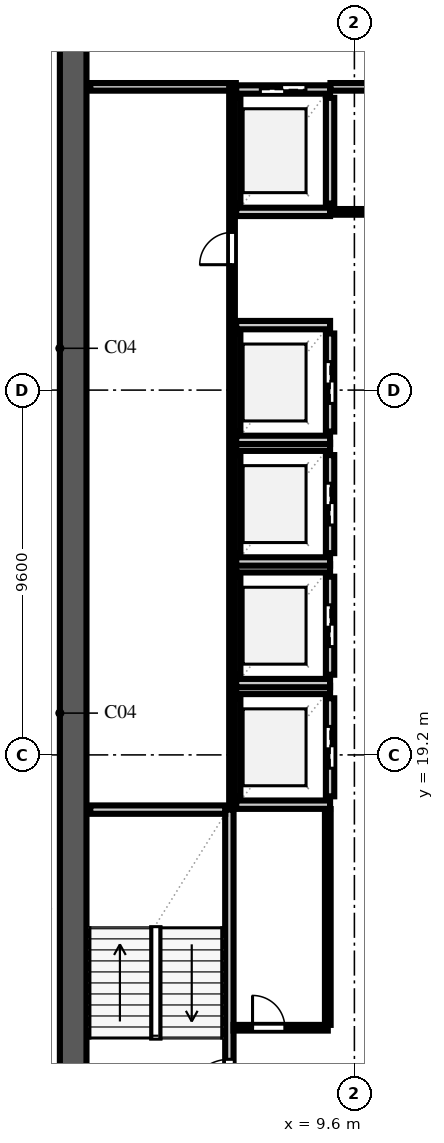
"""IFC4 building model, lengths in metres.
Left out: names, types, materials, properties, quantities, classifications, styles, units other than length and angle.
Written with IfcOpenShell. Run it as: python <this file> out.ifc"""

import sys

from ifc_helpers import new_model, si_unit, direction, frame, frame_2d, origin, place, context, subcontext, project, spatial, rectangle, extrude, element, fill, save


model = new_model("IFC4")
c1 = context("Model", 3, precision=1e-05, world=origin(), true_north=direction((0.0, 1.0)))
c2 = subcontext(c1, "Body", "Model", "MODEL_VIEW")
j1 = project(units=[si_unit("LENGTHUNIT", "METRE"), si_unit("PLANEANGLEUNIT", "RADIAN")], contexts=[c1])
p1 = place(None, origin())
s1 = spatial("IfcSite", under=j1, at=p1, CompositionType="ELEMENT")
p2 = place(p1, origin())
s2 = spatial("IfcBuilding", under=s1, at=p2, CompositionType="ELEMENT")
p3 = place(p2, frame((0.0, 0.0, 112.8)))
s3 = spatial("IfcBuildingStorey", under=s2, at=p3, CompositionType="ELEMENT", Elevation=112.8)
p4 = place(p3, frame((2.2, 9.25, 0.0), z_axis=(0.0, 0.0, 1.0), x_axis=(0.0, 1.0, 0.0)))
e1 = element("IfcWall", 1, at=p4, inside=s3, PredefinedType="SHEAR", context=c2, shape_type="SweptSolid", body=[
    extrude(rectangle(XDim=39.1, YDim=0.7, at=frame_2d((19.55, 0.0))), origin(), (0.0, 0.0, 1.0), 3.54),
])
p5 = place(p3, frame((6.31, 9.95, 0.0), z_axis=(0.0, 0.0, 1.0), x_axis=(0.0, 1.0, 0.0)))
e2 = element("IfcWall", 2, at=p5, inside=s3, PredefinedType="SOLIDWALL", context=c2, shape_type="SweptSolid", body=[
    extrude(rectangle(XDim=7.81, YDim=0.22, at=frame_2d((3.905, 0.0))), origin(), (0.0, 0.0, 1.0), 3.54),
])
p6 = place(p5, frame((0.14, 0.0, 0.0)))
e3 = element("IfcOpeningElement", 3, at=p6, cuts=e2, PredefinedType="OPENING", context=c2, shape_type="SweptSolid", body=[
    extrude(rectangle(XDim=1.1, YDim=2.2, at=frame_2d((0.55, 1.1))), frame((0.0, 0.122, 0.0), z_axis=(0.0, -1.0, 0.0), x_axis=(1.0, 0.0, 0.0)), (0.0, 0.0, 1.0), 0.244),
])
p7 = place(p3, frame((2.65, 17.76, 0.0), z_axis=(0.0, 0.0, 1.0), x_axis=(1.0, 0.0, 0.0)))
e4 = element("IfcWall", 4, at=p7, inside=s3, PredefinedType="SOLIDWALL", context=c2, shape_type="SweptSolid", body=[
    extrude(rectangle(XDim=3.55, YDim=0.22, at=frame_2d((1.775, 0.0))), origin(), (0.0, 0.0, 1.0), 3.54),
])
p8 = place(p3, frame((6.49, 18.11, 0.0), z_axis=(0.0, 0.0, 1.0), x_axis=(0.0, 1.0, 0.0)))
e5 = element("IfcWall", 5, at=p8, inside=s3, PredefinedType="SOLIDWALL", context=c2, shape_type="SweptSolid", body=[
    extrude(rectangle(XDim=2.58, YDim=0.22, at=frame_2d((1.29, 0.0))), origin(), (0.0, 0.0, 1.0), 3.54),
])
p9 = place(p3, frame((8.96, 18.11, 0.0), z_axis=(0.0, 0.0, 1.0), x_axis=(0.0, 1.0, 0.0)))
e6 = element("IfcWall", 6, at=p9, inside=s3, PredefinedType="SOLIDWALL", context=c2, shape_type="SweptSolid", body=[
    extrude(rectangle(XDim=2.58, YDim=0.22, at=frame_2d((1.29, 0.0))), origin(), (0.0, 0.0, 1.0), 3.54),
])
p10 = place(p9, frame((0.74, 0.0, 0.0)))
e7 = element("IfcOpeningElement", 7, at=p10, cuts=e6, PredefinedType="OPENING", context=c2, shape_type="SweptSolid", body=[
    extrude(rectangle(XDim=1.1, YDim=2.2, at=frame_2d((0.55, 1.1))), frame((0.0, 0.122, 0.0), z_axis=(0.0, -1.0, 0.0), x_axis=(1.0, 0.0, 0.0)), (0.0, 0.0, 1.0), 0.244),
])
for number, where, z_axis, x_axis in (
    (8, (6.49, 17.89, 0.0), (0.0, 0.0, 1.0), (1.0, 0.0, 0.0)),
    (9, (6.49, 20.91, 0.0), (0.0, 0.0, 1.0), (1.0, 0.0, 0.0)),
):
    element("IfcWall", number, at=place(p3, frame(where, z_axis=z_axis, x_axis=x_axis)), inside=s3, PredefinedType="SOLIDWALL", context=c2, shape_type="SweptSolid", body=[
        extrude(rectangle(XDim=2.47, YDim=0.22, at=frame_2d((1.235, 0.0))), origin(), (0.0, 0.0, 1.0), 3.54),
    ])
p11 = place(p3, frame((6.49, 21.31, 0.0), z_axis=(0.0, 0.0, 1.0), x_axis=(0.0, 1.0, 0.0)))
e10 = element("IfcWall", 10, at=p11, inside=s3, PredefinedType="SOLIDWALL", context=c2, shape_type="SweptSolid", body=[
    extrude(rectangle(XDim=2.58, YDim=0.22, at=frame_2d((1.29, 0.0))), origin(), (0.0, 0.0, 1.0), 3.54),
])
p12 = place(p3, frame((8.96, 21.31, 0.0), z_axis=(0.0, 0.0, 1.0), x_axis=(0.0, 1.0, 0.0)))
e11 = element("IfcWall", 11, at=p12, inside=s3, PredefinedType="SOLIDWALL", context=c2, shape_type="SweptSolid", body=[
    extrude(rectangle(XDim=2.58, YDim=0.22, at=frame_2d((1.29, 0.0))), origin(), (0.0, 0.0, 1.0), 3.54),
])
p13 = place(p12, frame((0.74, 0.0, 0.0)))
e12 = element("IfcOpeningElement", 12, at=p13, cuts=e11, PredefinedType="OPENING", context=c2, shape_type="SweptSolid", body=[
    extrude(rectangle(XDim=1.1, YDim=2.2, at=frame_2d((0.55, 1.1))), frame((0.0, 0.122, 0.0), z_axis=(0.0, -1.0, 0.0), x_axis=(1.0, 0.0, 0.0)), (0.0, 0.0, 1.0), 0.244),
])
for number, where, z_axis, x_axis in (
    (13, (6.49, 21.09, 0.0), (0.0, 0.0, 1.0), (1.0, 0.0, 0.0)),
    (14, (6.49, 24.11, 0.0), (0.0, 0.0, 1.0), (1.0, 0.0, 0.0)),
):
    element("IfcWall", number, at=place(p3, frame(where, z_axis=z_axis, x_axis=x_axis)), inside=s3, PredefinedType="SOLIDWALL", context=c2, shape_type="SweptSolid", body=[
        extrude(rectangle(XDim=2.47, YDim=0.22, at=frame_2d((1.235, 0.0))), origin(), (0.0, 0.0, 1.0), 3.54),
    ])
p14 = place(p3, frame((6.49, 24.51, 0.0), z_axis=(0.0, 0.0, 1.0), x_axis=(0.0, 1.0, 0.0)))
e15 = element("IfcWall", 15, at=p14, inside=s3, PredefinedType="SOLIDWALL", context=c2, shape_type="SweptSolid", body=[
    extrude(rectangle(XDim=2.58, YDim=0.22, at=frame_2d((1.29, 0.0))), origin(), (0.0, 0.0, 1.0), 3.54),
])
p15 = place(p3, frame((8.96, 24.51, 0.0), z_axis=(0.0, 0.0, 1.0), x_axis=(0.0, 1.0, 0.0)))
e16 = element("IfcWall", 16, at=p15, inside=s3, PredefinedType="SOLIDWALL", context=c2, shape_type="SweptSolid", body=[
    extrude(rectangle(XDim=2.58, YDim=0.22, at=frame_2d((1.29, 0.0))), origin(), (0.0, 0.0, 1.0), 3.54),
])
p16 = place(p15, frame((0.74, 0.0, 0.0)))
e17 = element("IfcOpeningElement", 17, at=p16, cuts=e16, PredefinedType="OPENING", context=c2, shape_type="SweptSolid", body=[
    extrude(rectangle(XDim=1.1, YDim=2.2, at=frame_2d((0.55, 1.1))), frame((0.0, 0.122, 0.0), z_axis=(0.0, -1.0, 0.0), x_axis=(1.0, 0.0, 0.0)), (0.0, 0.0, 1.0), 0.244),
])
for number, where, z_axis, x_axis in (
    (18, (6.49, 24.29, 0.0), (0.0, 0.0, 1.0), (1.0, 0.0, 0.0)),
    (19, (6.49, 27.31, 0.0), (0.0, 0.0, 1.0), (1.0, 0.0, 0.0)),
):
    element("IfcWall", number, at=place(p3, frame(where, z_axis=z_axis, x_axis=x_axis)), inside=s3, PredefinedType="SOLIDWALL", context=c2, shape_type="SweptSolid", body=[
        extrude(rectangle(XDim=2.47, YDim=0.22, at=frame_2d((1.235, 0.0))), origin(), (0.0, 0.0, 1.0), 3.54),
    ])
p17 = place(p3, frame((6.49, 27.71, 0.0), z_axis=(0.0, 0.0, 1.0), x_axis=(0.0, 1.0, 0.0)))
e20 = element("IfcWall", 20, at=p17, inside=s3, PredefinedType="SOLIDWALL", context=c2, shape_type="SweptSolid", body=[
    extrude(rectangle(XDim=2.58, YDim=0.22, at=frame_2d((1.29, 0.0))), origin(), (0.0, 0.0, 1.0), 3.54),
])
p18 = place(p3, frame((8.96, 27.71, 0.0), z_axis=(0.0, 0.0, 1.0), x_axis=(0.0, 1.0, 0.0)))
e21 = element("IfcWall", 21, at=p18, inside=s3, PredefinedType="SOLIDWALL", context=c2, shape_type="SweptSolid", body=[
    extrude(rectangle(XDim=2.58, YDim=0.22, at=frame_2d((1.29, 0.0))), origin(), (0.0, 0.0, 1.0), 3.54),
])
p19 = place(p18, frame((0.74, 0.0, 0.0)))
e22 = element("IfcOpeningElement", 22, at=p19, cuts=e21, PredefinedType="OPENING", context=c2, shape_type="SweptSolid", body=[
    extrude(rectangle(XDim=1.1, YDim=2.2, at=frame_2d((0.55, 1.1))), frame((0.0, 0.122, 0.0), z_axis=(0.0, -1.0, 0.0), x_axis=(1.0, 0.0, 0.0)), (0.0, 0.0, 1.0), 0.244),
])
for number, where, z_axis, x_axis in (
    (23, (6.49, 27.49, 0.0), (0.0, 0.0, 1.0), (1.0, 0.0, 0.0)),
    (24, (6.49, 30.51, 0.0), (0.0, 0.0, 1.0), (1.0, 0.0, 0.0)),
):
    element("IfcWall", number, at=place(p3, frame(where, z_axis=z_axis, x_axis=x_axis)), inside=s3, PredefinedType="SOLIDWALL", context=c2, shape_type="SweptSolid", body=[
        extrude(rectangle(XDim=2.47, YDim=0.22, at=frame_2d((1.235, 0.0))), origin(), (0.0, 0.0, 1.0), 3.54),
    ])
for number, where, z_axis, x_axis in (
    (25, (6.49, 33.71, 0.0), (0.0, 0.0, 1.0), (0.0, 1.0, 0.0)),
    (26, (8.96, 33.71, 0.0), (0.0, 0.0, 1.0), (0.0, 1.0, 0.0)),
):
    element("IfcWall", number, at=place(p3, frame(where, z_axis=z_axis, x_axis=x_axis)), inside=s3, PredefinedType="SOLIDWALL", context=c2, shape_type="SweptSolid", body=[
        extrude(rectangle(XDim=2.78, YDim=0.22, at=frame_2d((1.39, 0.0))), origin(), (0.0, 0.0, 1.0), 3.54),
    ])
p20 = place(p3, frame((6.49, 33.49, 0.0), z_axis=(0.0, 0.0, 1.0), x_axis=(1.0, 0.0, 0.0)))
e27 = element("IfcWall", 27, at=p20, inside=s3, PredefinedType="SOLIDWALL", context=c2, shape_type="SweptSolid", body=[
    extrude(rectangle(XDim=2.47, YDim=0.22, at=frame_2d((1.235, 0.0))), origin(), (0.0, 0.0, 1.0), 3.54),
])
p21 = place(p3, frame((6.49, 36.71, 0.0), z_axis=(0.0, 0.0, 1.0), x_axis=(1.0, 0.0, 0.0)))
e28 = element("IfcWall", 28, at=p21, inside=s3, PredefinedType="SOLIDWALL", context=c2, shape_type="SweptSolid", body=[
    extrude(rectangle(XDim=2.47, YDim=0.22, at=frame_2d((1.235, 0.0))), origin(), (0.0, 0.0, 1.0), 3.54),
])
p22 = place(p21, frame((0.635, 0.0, 0.0)))
e29 = element("IfcOpeningElement", 29, at=p22, cuts=e28, PredefinedType="OPENING", context=c2, shape_type="SweptSolid", body=[
    extrude(rectangle(XDim=1.2, YDim=2.2, at=frame_2d((0.6, 1.1))), frame((0.0, 0.122, 0.0), z_axis=(0.0, -1.0, 0.0), x_axis=(1.0, 0.0, 0.0)), (0.0, 0.0, 1.0), 0.244),
])
p23 = place(p3, frame((2.65, 36.78, 0.0), z_axis=(0.0, 0.0, 1.0), x_axis=(1.0, 0.0, 0.0)))
e30 = element("IfcWall", 30, at=p23, inside=s3, PredefinedType="SOLIDWALL", context=c2, shape_type="SweptSolid", body=[
    extrude(rectangle(XDim=3.83, YDim=0.2, at=frame_2d((1.915, 0.0))), origin(), (0.0, 0.0, 1.0), 3.54),
])
p24 = place(p3, frame((8.97, 36.78, 0.0), z_axis=(0.0, 0.0, 1.0), x_axis=(1.0, 0.0, 0.0)))
e31 = element("IfcWall", 31, at=p24, inside=s3, PredefinedType="SOLIDWALL", context=c2, shape_type="SweptSolid", body=[
    extrude(rectangle(XDim=1.51, YDim=0.2, at=frame_2d((0.755, 0.0))), origin(), (0.0, 0.0, 1.0), 3.54),
])
p25 = place(p3, frame((8.965, 33.49, 0.0), z_axis=(0.0, 0.0, 1.0), x_axis=(1.0, 0.0, 0.0)))
e32 = element("IfcWall", 32, at=p25, inside=s3, PredefinedType="PARTITIONING", context=c2, shape_type="SweptSolid", body=[
    extrude(rectangle(XDim=1.52, YDim=0.15, at=frame_2d((0.76, 0.0))), origin(), (0.0, 0.0, 1.0), 3.54),
])
p26 = place(p3, frame((6.42, 12.02, 0.0), z_axis=(0.0, 0.0, 1.0), x_axis=(1.0, 0.0, 0.0)))
e33 = element("IfcWall", 33, at=p26, inside=s3, PredefinedType="PARTITIONING", context=c2, shape_type="SweptSolid", body=[
    extrude(rectangle(XDim=2.48, YDim=0.15, at=frame_2d((1.24, 0.0))), origin(), (0.0, 0.0, 1.0), 3.54),
])
p27 = place(p26, frame((0.5, 0.0, 0.0)))
e34 = element("IfcOpeningElement", 34, at=p27, cuts=e33, PredefinedType="OPENING", context=c2, shape_type="SweptSolid", body=[
    extrude(rectangle(XDim=0.85, YDim=2.1, at=frame_2d((0.425, 1.05))), frame((0.0, 0.087, 0.0), z_axis=(0.0, -1.0, 0.0), x_axis=(1.0, 0.0, 0.0)), (0.0, 0.0, 1.0), 0.174),
])
p28 = place(p3, frame((8.9, 12.095, 0.0), z_axis=(0.0, 0.0, 1.0), x_axis=(0.0, 1.0, 0.0)))
e35 = element("IfcWall", 35, at=p28, inside=s3, PredefinedType="PARTITIONING", context=c2, shape_type="SweptSolid", body=[
    extrude(rectangle(XDim=5.68, YDim=0.15, at=frame_2d((2.84, 0.0))), origin(), (0.0, 0.0, 1.0), 3.54),
])
p29 = place(p3, frame((6.38, 17.8, 0.0), z_axis=(0.0, 0.0, 1.0), x_axis=(0.0, 1.0, 0.0)))
e36 = element("IfcWall", 36, at=p29, inside=s3, PredefinedType="PARTITIONING", context=c2, shape_type="SweptSolid", body=[
    extrude(rectangle(XDim=18.98, YDim=0.15, at=frame_2d((9.49, 0.0))), origin(), (0.0, 0.0, 1.0), 3.54),
])
p30 = place(p29, frame((14.3, 0.0, 0.0)))
e37 = element("IfcOpeningElement", 37, at=p30, cuts=e36, PredefinedType="OPENING", context=c2, shape_type="SweptSolid", body=[
    extrude(rectangle(XDim=0.85, YDim=2.1, at=frame_2d((0.425, 1.05))), frame((0.0, 0.087, 0.0), z_axis=(0.0, -1.0, 0.0), x_axis=(1.0, 0.0, 0.0)), (0.0, 0.0, 1.0), 0.174),
])
p31 = place(p6, origin())
e38 = element("IfcDoor", 38, at=p31, inside=s3, OperationType="SINGLE_SWING_LEFT", PredefinedType="DOOR", context=c2, shape_type="SweptSolid", body=[
    extrude(rectangle(XDim=1.1, YDim=2.2, at=frame_2d((0.55, 1.1))), frame((0.0, 0.025, 0.0), z_axis=(0.0, -1.0, 0.0), x_axis=(1.0, 0.0, 0.0)), (0.0, 0.0, 1.0), 0.05),
])
fill(e3, e38)
p32 = place(p10, origin())
e39 = element("IfcDoor", 39, at=p32, inside=s3, OperationType="DOUBLE_DOOR_SLIDING", PredefinedType="DOOR", context=c2, shape_type="SweptSolid", body=[
    extrude(rectangle(XDim=1.1, YDim=2.2, at=frame_2d((0.55, 1.1))), frame((0.0, 0.025, 0.0), z_axis=(0.0, -1.0, 0.0), x_axis=(1.0, 0.0, 0.0)), (0.0, 0.0, 1.0), 0.05),
])
fill(e7, e39)
p33 = place(p13, origin())
e40 = element("IfcDoor", 40, at=p33, inside=s3, OperationType="DOUBLE_DOOR_SLIDING", PredefinedType="DOOR", context=c2, shape_type="SweptSolid", body=[
    extrude(rectangle(XDim=1.1, YDim=2.2, at=frame_2d((0.55, 1.1))), frame((0.0, 0.025, 0.0), z_axis=(0.0, -1.0, 0.0), x_axis=(1.0, 0.0, 0.0)), (0.0, 0.0, 1.0), 0.05),
])
fill(e12, e40)
p34 = place(p16, origin())
e41 = element("IfcDoor", 41, at=p34, inside=s3, OperationType="DOUBLE_DOOR_SLIDING", PredefinedType="DOOR", context=c2, shape_type="SweptSolid", body=[
    extrude(rectangle(XDim=1.1, YDim=2.2, at=frame_2d((0.55, 1.1))), frame((0.0, 0.025, 0.0), z_axis=(0.0, -1.0, 0.0), x_axis=(1.0, 0.0, 0.0)), (0.0, 0.0, 1.0), 0.05),
])
fill(e17, e41)
p35 = place(p19, origin())
e42 = element("IfcDoor", 42, at=p35, inside=s3, OperationType="DOUBLE_DOOR_SLIDING", PredefinedType="DOOR", context=c2, shape_type="SweptSolid", body=[
    extrude(rectangle(XDim=1.1, YDim=2.2, at=frame_2d((0.55, 1.1))), frame((0.0, 0.025, 0.0), z_axis=(0.0, -1.0, 0.0), x_axis=(1.0, 0.0, 0.0)), (0.0, 0.0, 1.0), 0.05),
])
fill(e22, e42)
p36 = place(p22, origin())
e43 = element("IfcDoor", 43, at=p36, inside=s3, OperationType="DOUBLE_DOOR_SLIDING", PredefinedType="DOOR", context=c2, shape_type="SweptSolid", body=[
    extrude(rectangle(XDim=1.2, YDim=2.2, at=frame_2d((0.6, 1.1))), frame((0.0, 0.025, 0.0), z_axis=(0.0, -1.0, 0.0), x_axis=(1.0, 0.0, 0.0)), (0.0, 0.0, 1.0), 0.05),
])
fill(e29, e43)
p37 = place(p27, origin())
e44 = element("IfcDoor", 44, at=p37, inside=s3, OperationType="SINGLE_SWING_LEFT", PredefinedType="DOOR", context=c2, shape_type="SweptSolid", body=[
    extrude(rectangle(XDim=0.85, YDim=2.1, at=frame_2d((0.425, 1.05))), frame((0.0, 0.025, 0.0), z_axis=(0.0, -1.0, 0.0), x_axis=(1.0, 0.0, 0.0)), (0.0, 0.0, 1.0), 0.05),
])
fill(e34, e44)
p38 = place(p30, origin())
e45 = element("IfcDoor", 45, at=p38, inside=s3, OperationType="SINGLE_SWING_LEFT", PredefinedType="DOOR", context=c2, shape_type="SweptSolid", body=[
    extrude(rectangle(XDim=0.85, YDim=2.1, at=frame_2d((0.425, 1.05))), frame((0.0, 0.025, 0.0), z_axis=(0.0, -1.0, 0.0), x_axis=(1.0, 0.0, 0.0)), (0.0, 0.0, 1.0), 0.05),
])
fill(e37, e45)
save(model, sys.argv[1])
